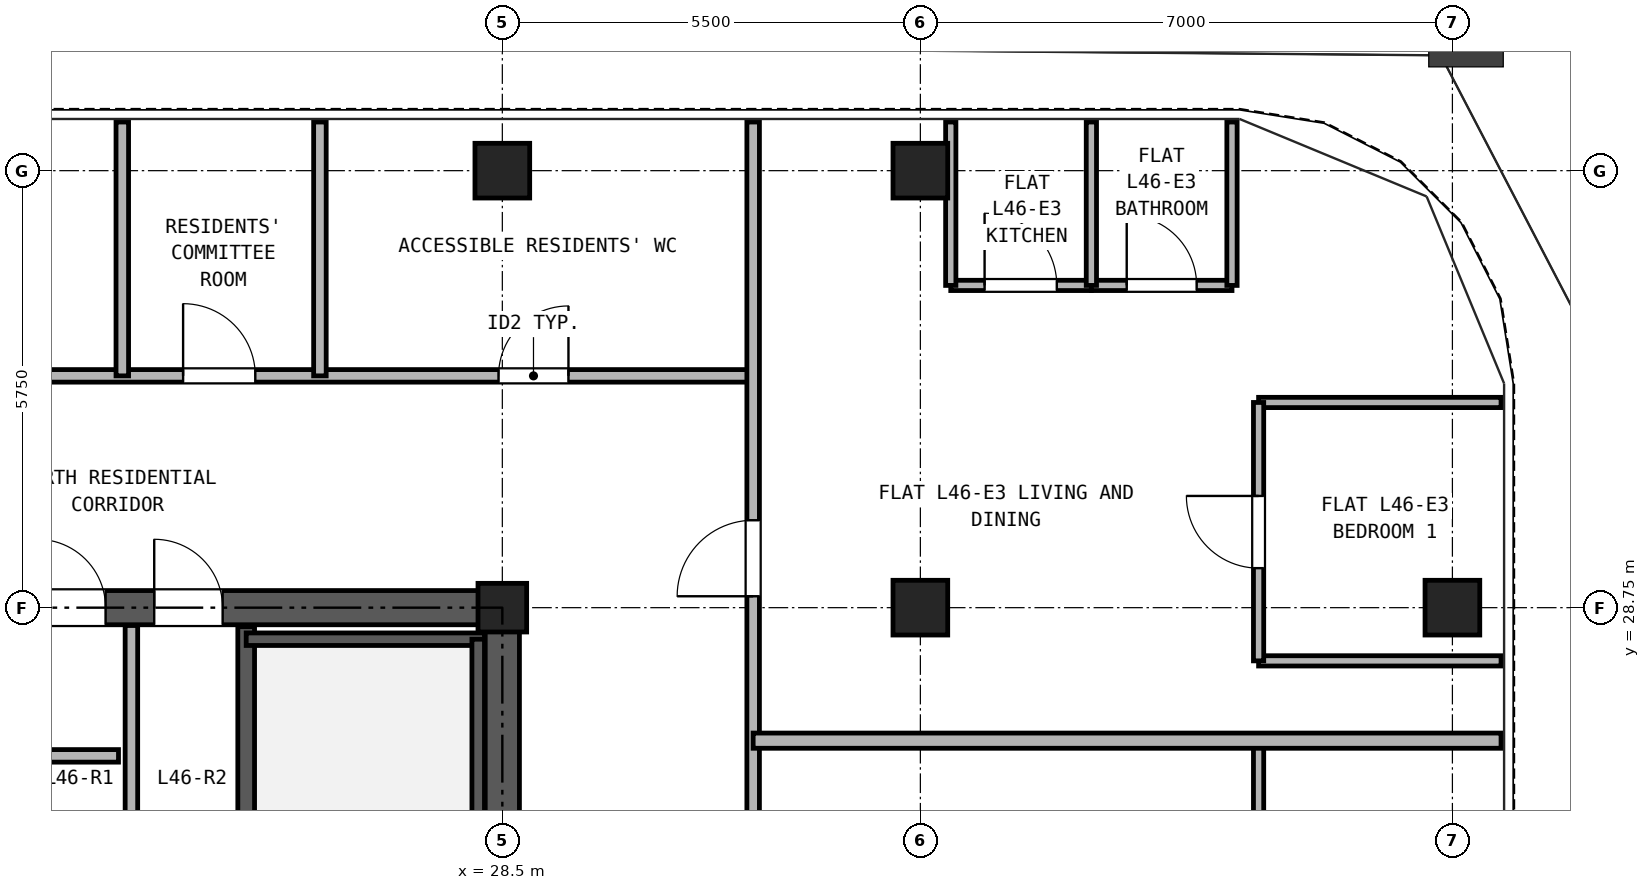
"""IFC4 building model, lengths in metres.
Left out: names, types, materials, properties, quantities, classifications, styles, units other than length and angle.
Written with IfcOpenShell. Run it as: python <this file> out.ifc"""

import sys

from ifc_helpers import new_model, si_unit, direction, frame, frame_2d, origin, origin_2d, place, context, subcontext, project, spatial, rectangle, hollow_rectangle, extrude, source, transform, mapped, element, fill, save


model = new_model("IFC4")
c1 = context("Model", 3, precision=1e-05, world=origin(), true_north=direction((0.0, 1.0)))
c2 = subcontext(c1, "Body", "Model", "MODEL_VIEW")
j1 = project(units=[si_unit("LENGTHUNIT", "METRE"), si_unit("PLANEANGLEUNIT", "RADIAN")], contexts=[c1])
p1 = place(None, origin())
s1 = spatial("IfcSite", under=j1, at=p1, CompositionType="ELEMENT")
p2 = place(p1, origin())
s2 = spatial("IfcBuilding", under=s1, at=p2, CompositionType="ELEMENT")
p3 = place(p2, frame((0.0, 0.0, 165.7)))
s3 = spatial("IfcBuildingStorey", under=s2, at=p3, CompositionType="ELEMENT", Elevation=165.7)
m1 = source(origin(), c2, "Body", "SweptSolid", [
    extrude(hollow_rectangle(XDim=0.72, YDim=0.72, WallThickness=0.04, at=origin_2d()), origin(), (0.0, 0.0, 1.0), 2.95),
])
for number, where, z_axis, x_axis in (
    (1, (28.5, 34.5, 0.0), (0.0, 0.0, 1.0), (1.0, 0.0, 0.0)),
    (2, (34.0, 34.5, 0.0), (0.0, 0.0, 1.0), (1.0, 0.0, 0.0)),
    (3, (41.0, 28.75, 0.0), (0.0, 0.0, 1.0), (1.0, 0.0, 0.0)),
):
    element("IfcColumn", number, at=place(p3, frame(where, z_axis=z_axis, x_axis=x_axis)), inside=s3, PredefinedType="COLUMN", context=c2, shape_type="MappedRepresentation", body=[
        mapped(m1, transform((0.0, 0.0, 0.0), x_axis=(1.0, 0.0, 0.0), y_axis=(0.0, 1.0, 0.0), z_axis=(0.0, 0.0, 1.0), scale=1.0)),
    ])
m2 = source(origin(), c2, "Body", "SweptSolid", [
    extrude(hollow_rectangle(XDim=0.64, YDim=0.64, WallThickness=0.035, at=origin_2d()), origin(), (0.0, 0.0, 1.0), 2.95),
])
p4 = place(p3, frame((28.5, 28.75, 0.0), z_axis=(0.0, 0.0, 1.0), x_axis=(1.0, 0.0, 0.0)))
e4 = element("IfcColumn", 4, at=p4, inside=s3, PredefinedType="COLUMN", context=c2, shape_type="MappedRepresentation", body=[
    mapped(m2, transform((0.0, 0.0, 0.0), x_axis=(1.0, 0.0, 0.0), y_axis=(0.0, 1.0, 0.0), z_axis=(0.0, 0.0, 1.0), scale=1.0)),
])
p5 = place(p3, frame((34.0, 28.75, 0.0), z_axis=(0.0, 0.0, 1.0), x_axis=(1.0, 0.0, 0.0)))
e5 = element("IfcColumn", 5, at=p5, inside=s3, PredefinedType="COLUMN", context=c2, shape_type="MappedRepresentation", body=[
    mapped(m1, transform((0.0, 0.0, 0.0), x_axis=(1.0, 0.0, 0.0), y_axis=(0.0, 1.0, 0.0), z_axis=(0.0, 0.0, 1.0), scale=1.0)),
])
p6 = place(p3, frame((18.275, 28.75, 0.0), z_axis=(0.0, 0.0, 1.0), x_axis=(1.0, 0.0, 0.0)))
e6 = element("IfcWall", 6, at=p6, inside=s3, PredefinedType="SHEAR", context=c2, shape_type="SweptSolid", body=[
    extrude(rectangle(XDim=10.45, YDim=0.45, at=frame_2d((5.225, 0.0))), origin(), (0.0, 0.0, 1.0), 2.95),
])
p7 = place(p6, frame((4.105, 0.0, 0.0)))
e7 = element("IfcOpeningElement", 7, at=p7, cuts=e6, PredefinedType="OPENING", context=c2, shape_type="SweptSolid", body=[
    extrude(rectangle(XDim=0.9, YDim=2.05, at=frame_2d((0.45, 1.025))), frame((0.0, 0.235, 0.0), z_axis=(0.0, -1.0, 0.0), x_axis=(1.0, 0.0, 0.0)), (0.0, 0.0, 1.0), 0.47),
])
p8 = place(p6, frame((5.645, 0.0, 0.0)))
e8 = element("IfcOpeningElement", 8, at=p8, cuts=e6, PredefinedType="OPENING", context=c2, shape_type="SweptSolid", body=[
    extrude(rectangle(XDim=0.9, YDim=2.05, at=frame_2d((0.45, 1.025))), frame((0.0, 0.235, 0.0), z_axis=(0.0, -1.0, 0.0), x_axis=(1.0, 0.0, 0.0)), (0.0, 0.0, 1.0), 0.47),
])
p9 = place(p3, frame((28.5, 11.725, 0.0), z_axis=(0.0, 0.0, 1.0), x_axis=(0.0, 1.0, 0.0)))
e9 = element("IfcWall", 9, at=p9, inside=s3, PredefinedType="SHEAR", context=c2, shape_type="SweptSolid", body=[
    extrude(rectangle(XDim=16.8, YDim=0.45, at=frame_2d((8.4, 0.0))), origin(), (0.0, 0.0, 1.0), 2.95),
])
p10 = place(p9, frame((7.425, 0.0, 0.0)))
e10 = element("IfcOpeningElement", 10, at=p10, cuts=e9, PredefinedType="OPENING", context=c2, shape_type="SweptSolid", body=[
    extrude(rectangle(XDim=1.15, YDim=2.2, at=frame_2d((0.575, 1.1))), frame((0.0, 0.235, 0.0), z_axis=(0.0, -1.0, 0.0), x_axis=(1.0, 0.0, 0.0)), (0.0, 0.0, 1.0), 0.47),
])
p11 = place(p3, frame((25.13, 21.39, 0.0), z_axis=(0.0, 0.0, 1.0), x_axis=(0.0, 1.0, 0.0)))
e11 = element("IfcWall", 11, at=p11, inside=s3, PredefinedType="SOLIDWALL", context=c2, shape_type="SweptSolid", body=[
    extrude(rectangle(XDim=7.11, YDim=0.22, at=frame_2d((3.555, 0.0))), origin(), (0.0, 0.0, 1.0), 2.95),
])
p12 = place(p3, frame((25.13, 28.335, 0.0), z_axis=(0.0, 0.0, 1.0), x_axis=(1.0, 0.0, 0.0)))
e12 = element("IfcWall", 12, at=p12, inside=s3, PredefinedType="PARTITIONING", context=c2, shape_type="SweptSolid", body=[
    extrude(rectangle(XDim=3.135, YDim=0.165, at=frame_2d((1.567, 0.0))), origin(), (0.0, 0.0, 1.0), 2.95),
])
p13 = place(p3, frame((28.183, 21.39, 0.0), z_axis=(0.0, 0.0, 1.0), x_axis=(0.0, 1.0, 0.0)))
e13 = element("IfcWall", 13, at=p13, inside=s3, PredefinedType="PARTITIONING", context=c2, shape_type="SweptSolid", body=[
    extrude(rectangle(XDim=6.945, YDim=0.165, at=frame_2d((3.473, 0.0))), origin(), (0.0, 0.0, 1.0), 2.95),
])
p14 = place(p3, frame((23.62, 24.4, 0.0), z_axis=(0.0, 0.0, 1.0), x_axis=(0.0, 1.0, 0.0)))
e14 = element("IfcWall", 14, at=p14, inside=s3, PredefinedType="PARTITIONING", context=c2, shape_type="SweptSolid", body=[
    extrude(rectangle(XDim=4.115, YDim=0.165, at=frame_2d((2.058, 0.0))), origin(), (0.0, 0.0, 1.0), 2.95),
])
p15 = place(p3, frame((15.2, 31.8, 0.0), z_axis=(0.0, 0.0, 1.0), x_axis=(1.0, 0.0, 0.0)))
e15 = element("IfcWall", 15, at=p15, inside=s3, PredefinedType="PARTITIONING", context=c2, shape_type="SweptSolid", body=[
    extrude(rectangle(XDim=16.6, YDim=0.165, at=frame_2d((8.3, 0.0))), origin(), (0.0, 0.0, 1.0), 2.583),
])
p16 = place(p15, frame((3.65, 0.0, 0.0)))
e16 = element("IfcOpeningElement", 16, at=p16, cuts=e15, PredefinedType="OPENING", context=c2, shape_type="SweptSolid", body=[
    extrude(rectangle(XDim=0.95, YDim=2.15, at=frame_2d((0.475, 1.075))), frame((0.0, 0.093, 0.0), z_axis=(0.0, -1.0, 0.0), x_axis=(1.0, 0.0, 0.0)), (0.0, 0.0, 1.0), 0.185),
])
p17 = place(p15, frame((9.1, 0.0, 0.0)))
e17 = element("IfcOpeningElement", 17, at=p17, cuts=e15, PredefinedType="OPENING", context=c2, shape_type="SweptSolid", body=[
    extrude(rectangle(XDim=0.95, YDim=2.15, at=frame_2d((0.475, 1.075))), frame((0.0, 0.093, 0.0), z_axis=(0.0, -1.0, 0.0), x_axis=(1.0, 0.0, 0.0)), (0.0, 0.0, 1.0), 0.185),
])
p18 = place(p15, frame((13.25, 0.0, 0.0)))
e18 = element("IfcOpeningElement", 18, at=p18, cuts=e15, PredefinedType="OPENING", context=c2, shape_type="SweptSolid", body=[
    extrude(rectangle(XDim=0.92, YDim=2.1, at=frame_2d((0.46, 1.05))), frame((0.0, 0.093, 0.0), z_axis=(0.0, -1.0, 0.0), x_axis=(1.0, 0.0, 0.0)), (0.0, 0.0, 1.0), 0.185),
])
p19 = place(p3, frame((31.8, 10.65, 0.0), z_axis=(0.0, 0.0, 1.0), x_axis=(0.0, 1.0, 0.0)))
e19 = element("IfcWall", 19, at=p19, inside=s3, PredefinedType="PARTITIONING", context=c2, shape_type="SweptSolid", body=[
    extrude(rectangle(XDim=24.49, YDim=0.165, at=frame_2d((12.245, 0.0))), origin(), (0.0, 0.0, 1.0), 2.95),
])
p20 = place(p19, frame((3.425, 0.0, 0.0)))
e20 = element("IfcOpeningElement", 20, at=p20, cuts=e19, PredefinedType="OPENING", context=c2, shape_type="SweptSolid", body=[
    extrude(rectangle(XDim=1.0, YDim=2.15, at=frame_2d((0.5, 1.075))), frame((0.0, 0.093, 0.0), z_axis=(0.0, -1.0, 0.0), x_axis=(1.0, 0.0, 0.0)), (0.0, 0.0, 1.0), 0.185),
])
p21 = place(p19, frame((11.6, 0.0, 0.0)))
e21 = element("IfcOpeningElement", 21, at=p21, cuts=e19, PredefinedType="OPENING", context=c2, shape_type="SweptSolid", body=[
    extrude(rectangle(XDim=1.0, YDim=2.15, at=frame_2d((0.5, 1.075))), frame((0.0, 0.093, 0.0), z_axis=(0.0, -1.0, 0.0), x_axis=(1.0, 0.0, 0.0)), (0.0, 0.0, 1.0), 0.185),
])
p22 = place(p19, frame((18.25, 0.0, 0.0)))
e22 = element("IfcOpeningElement", 22, at=p22, cuts=e19, PredefinedType="OPENING", context=c2, shape_type="SweptSolid", body=[
    extrude(rectangle(XDim=1.0, YDim=2.15, at=frame_2d((0.5, 1.075))), frame((0.0, 0.093, 0.0), z_axis=(0.0, -1.0, 0.0), x_axis=(1.0, 0.0, 0.0)), (0.0, 0.0, 1.0), 0.185),
])
p23 = place(p3, frame((38.45, 22.5, 0.0), z_axis=(0.0, 0.0, 1.0), x_axis=(0.0, 1.0, 0.0)))
e23 = element("IfcWall", 23, at=p23, inside=s3, PredefinedType="PARTITIONING", context=c2, shape_type="SweptSolid", body=[
    extrude(rectangle(XDim=4.5, YDim=0.135, at=frame_2d((2.25, 0.0))), origin(), (0.0, 0.0, 1.0), 2.95),
])
p24 = place(p23, frame((1.77, 0.0, 0.0)))
e24 = element("IfcOpeningElement", 24, at=p24, cuts=e23, PredefinedType="OPENING", context=c2, shape_type="SweptSolid", body=[
    extrude(rectangle(XDim=0.95, YDim=2.15, at=frame_2d((0.475, 1.075))), frame((0.0, 0.077, 0.0), z_axis=(0.0, -1.0, 0.0), x_axis=(1.0, 0.0, 0.0)), (0.0, 0.0, 1.0), 0.155),
])
p25 = place(p3, frame((31.8, 27.0, 0.0), z_axis=(0.0, 0.0, 1.0), x_axis=(1.0, 0.0, 0.0)))
e25 = element("IfcWall", 25, at=p25, inside=s3, PredefinedType="PARTITIONING", context=c2, shape_type="SweptSolid", body=[
    extrude(rectangle(XDim=9.84, YDim=0.2, at=frame_2d((4.92, 0.0))), origin(), (0.0, 0.0, 1.0), 2.95),
])
p26 = place(p3, frame((34.4, 32.99, 0.0), z_axis=(0.0, 0.0, 1.0), x_axis=(1.0, 0.0, 0.0)))
e26 = element("IfcWall", 26, at=p26, inside=s3, PredefinedType="PARTITIONING", context=c2, shape_type="SweptSolid", body=[
    extrude(rectangle(XDim=1.85, YDim=0.135, at=frame_2d((0.925, 0.0))), origin(), (0.0, 0.0, 1.0), 2.95),
])
p27 = place(p26, frame((0.445, 0.0, 0.0)))
e27 = element("IfcOpeningElement", 27, at=p27, cuts=e26, PredefinedType="OPENING", context=c2, shape_type="SweptSolid", body=[
    extrude(rectangle(XDim=0.95, YDim=2.15, at=frame_2d((0.475, 1.075))), frame((0.0, 0.077, 0.0), z_axis=(0.0, -1.0, 0.0), x_axis=(1.0, 0.0, 0.0)), (0.0, 0.0, 1.0), 0.155),
])
p28 = place(p3, frame((36.25, 32.99, 0.0), z_axis=(0.0, 0.0, 1.0), x_axis=(1.0, 0.0, 0.0)))
e28 = element("IfcWall", 28, at=p28, inside=s3, PredefinedType="PARTITIONING", context=c2, shape_type="SweptSolid", body=[
    extrude(rectangle(XDim=1.85, YDim=0.135, at=frame_2d((0.925, 0.0))), origin(), (0.0, 0.0, 1.0), 2.95),
])
p29 = place(p28, frame((0.465, 0.0, 0.0)))
e29 = element("IfcOpeningElement", 29, at=p29, cuts=e28, PredefinedType="OPENING", context=c2, shape_type="SweptSolid", body=[
    extrude(rectangle(XDim=0.92, YDim=2.1, at=frame_2d((0.46, 1.05))), frame((0.0, 0.077, 0.0), z_axis=(0.0, -1.0, 0.0), x_axis=(1.0, 0.0, 0.0)), (0.0, 0.0, 1.0), 0.155),
])
for number, where, z_axis, x_axis in (
    (30, (34.4, 32.99, 0.0), (0.0, 0.0, 1.0), (0.0, 1.0, 0.0)),
    (31, (36.25, 32.99, 0.0), (0.0, 0.0, 1.0), (0.0, 1.0, 0.0)),
    (32, (38.1, 32.99, 0.0), (0.0, 0.0, 1.0), (0.0, 1.0, 0.0)),
):
    element("IfcWall", number, at=place(p3, frame(where, z_axis=z_axis, x_axis=x_axis)), inside=s3, PredefinedType="PARTITIONING", context=c2, shape_type="SweptSolid", body=[
        extrude(rectangle(XDim=2.15, YDim=0.135, at=frame_2d((1.075, 0.0))), origin(), (0.0, 0.0, 1.0), 2.95),
    ])
for number, where, z_axis, x_axis in (
    (33, (38.45, 28.05, 0.0), (0.0, 0.0, 1.0), (1.0, 0.0, 0.0)),
    (34, (38.45, 31.45, 0.0), (0.0, 0.0, 1.0), (1.0, 0.0, 0.0)),
):
    element("IfcWall", number, at=place(p3, frame(where, z_axis=z_axis, x_axis=x_axis)), inside=s3, PredefinedType="PARTITIONING", context=c2, shape_type="SweptSolid", body=[
        extrude(rectangle(XDim=3.19, YDim=0.135, at=frame_2d((1.595, 0.0))), origin(), (0.0, 0.0, 1.0), 2.95),
    ])
p30 = place(p3, frame((38.45, 28.05, 0.0), z_axis=(0.0, 0.0, 1.0), x_axis=(0.0, 1.0, 0.0)))
e35 = element("IfcWall", 35, at=p30, inside=s3, PredefinedType="PARTITIONING", context=c2, shape_type="SweptSolid", body=[
    extrude(rectangle(XDim=3.4, YDim=0.135, at=frame_2d((1.7, 0.0))), origin(), (0.0, 0.0, 1.0), 2.95),
])
p31 = place(p30, frame((1.22, 0.0, 0.0)))
e36 = element("IfcOpeningElement", 36, at=p31, cuts=e35, PredefinedType="OPENING", context=c2, shape_type="SweptSolid", body=[
    extrude(rectangle(XDim=0.95, YDim=2.15, at=frame_2d((0.475, 1.075))), frame((0.0, 0.077, 0.0), z_axis=(0.0, -1.0, 0.0), x_axis=(1.0, 0.0, 0.0)), (0.0, 0.0, 1.0), 0.155),
])
for number, where, z_axis, x_axis in (
    (37, (23.5, 31.8, 0.0), (0.0, 0.0, 1.0), (0.0, 1.0, 0.0)),
    (38, (26.1, 31.8, 0.0), (0.0, 0.0, 1.0), (0.0, 1.0, 0.0)),
):
    element("IfcWall", number, at=place(p3, frame(where, z_axis=z_axis, x_axis=x_axis)), inside=s3, PredefinedType="PARTITIONING", context=c2, shape_type="SweptSolid", body=[
        extrude(rectangle(XDim=3.34, YDim=0.165, at=frame_2d((1.67, 0.0))), origin(), (0.0, 0.0, 1.0), 2.95),
    ])
p32 = place(p3, frame((22.35, 26.8, 0.0), z_axis=(0.0, 0.0, 1.0), x_axis=(1.0, 0.0, 0.0)))
e39 = element("IfcWall", 39, at=p32, inside=s3, PredefinedType="PARTITIONING", context=c2, shape_type="SweptSolid", body=[
    extrude(rectangle(XDim=1.1, YDim=0.165, at=frame_2d((0.55, 0.0))), origin(), (0.0, 0.0, 1.0), 2.95),
])
p33 = place(p7, origin())
e40 = element("IfcDoor", 40, at=p33, inside=s3, OperationType="SINGLE_SWING_LEFT", PredefinedType="DOOR", context=c2, shape_type="SweptSolid", body=[
    extrude(rectangle(XDim=0.9, YDim=2.05, at=frame_2d((0.45, 1.025))), frame((0.0, 0.025, 0.0), z_axis=(0.0, -1.0, 0.0), x_axis=(1.0, 0.0, 0.0)), (0.0, 0.0, 1.0), 0.05),
])
fill(e7, e40)
p34 = place(p8, origin())
e41 = element("IfcDoor", 41, at=p34, inside=s3, OperationType="SINGLE_SWING_LEFT", PredefinedType="DOOR", context=c2, shape_type="SweptSolid", body=[
    extrude(rectangle(XDim=0.9, YDim=2.05, at=frame_2d((0.45, 1.025))), frame((0.0, 0.025, 0.0), z_axis=(0.0, -1.0, 0.0), x_axis=(1.0, 0.0, 0.0)), (0.0, 0.0, 1.0), 0.05),
])
fill(e8, e41)
p35 = place(p27, frame((0.95, 0.0, 0.0), z_axis=(0.0, 0.0, 1.0), x_axis=(-1.0, 0.0, 0.0)))
e42 = element("IfcDoor", 42, at=p35, inside=s3, OperationType="SINGLE_SWING_LEFT", PredefinedType="DOOR", context=c2, shape_type="SweptSolid", body=[
    extrude(rectangle(XDim=0.95, YDim=2.15, at=frame_2d((0.475, 1.075))), frame((0.0, 0.025, 0.0), z_axis=(0.0, -1.0, 0.0), x_axis=(1.0, 0.0, 0.0)), (0.0, 0.0, 1.0), 0.05),
])
fill(e27, e42)
p36 = place(p29, frame((0.92, 0.0, 0.0), z_axis=(0.0, 0.0, 1.0), x_axis=(-1.0, 0.0, 0.0)))
e43 = element("IfcDoor", 43, at=p36, inside=s3, OperationType="SINGLE_SWING_LEFT", PredefinedType="DOOR", context=c2, shape_type="SweptSolid", body=[
    extrude(rectangle(XDim=0.92, YDim=2.1, at=frame_2d((0.46, 1.05))), frame((0.0, 0.025, 0.0), z_axis=(0.0, -1.0, 0.0), x_axis=(1.0, 0.0, 0.0)), (0.0, 0.0, 1.0), 0.05),
])
fill(e29, e43)
p37 = place(p31, frame((0.95, 0.0, 0.0), z_axis=(0.0, 0.0, 1.0), x_axis=(-1.0, 0.0, 0.0)))
e44 = element("IfcDoor", 44, at=p37, inside=s3, OperationType="SINGLE_SWING_RIGHT", PredefinedType="DOOR", context=c2, shape_type="SweptSolid", body=[
    extrude(rectangle(XDim=0.95, YDim=2.15, at=frame_2d((0.475, 1.075))), frame((0.0, 0.025, 0.0), z_axis=(0.0, -1.0, 0.0), x_axis=(1.0, 0.0, 0.0)), (0.0, 0.0, 1.0), 0.05),
])
fill(e36, e44)
p38 = place(p22, frame((1.0, 0.0, 0.0), z_axis=(0.0, 0.0, 1.0), x_axis=(-1.0, 0.0, 0.0)))
e45 = element("IfcDoor", 45, at=p38, inside=s3, OperationType="SINGLE_SWING_LEFT", PredefinedType="DOOR", context=c2, shape_type="SweptSolid", body=[
    extrude(rectangle(XDim=1.0, YDim=2.15, at=frame_2d((0.5, 1.075))), frame((0.0, 0.025, 0.0), z_axis=(0.0, -1.0, 0.0), x_axis=(1.0, 0.0, 0.0)), (0.0, 0.0, 1.0), 0.05),
])
fill(e22, e45)
p39 = place(p17, origin())
e46 = element("IfcDoor", 46, at=p39, inside=s3, OperationType="SINGLE_SWING_LEFT", PredefinedType="DOOR", context=c2, shape_type="SweptSolid", body=[
    extrude(rectangle(XDim=0.95, YDim=2.15, at=frame_2d((0.475, 1.075))), frame((0.0, 0.025, 0.0), z_axis=(0.0, -1.0, 0.0), x_axis=(1.0, 0.0, 0.0)), (0.0, 0.0, 1.0), 0.05),
])
fill(e17, e46)
p40 = place(p18, origin())
e47 = element("IfcDoor", 47, at=p40, inside=s3, OperationType="SINGLE_SWING_RIGHT", PredefinedType="DOOR", context=c2, shape_type="SweptSolid", body=[
    extrude(rectangle(XDim=0.92, YDim=2.1, at=frame_2d((0.46, 1.05))), frame((0.0, 0.025, 0.0), z_axis=(0.0, -1.0, 0.0), x_axis=(1.0, 0.0, 0.0)), (0.0, 0.0, 1.0), 0.05),
])
fill(e18, e47)
save(model, sys.argv[1])
